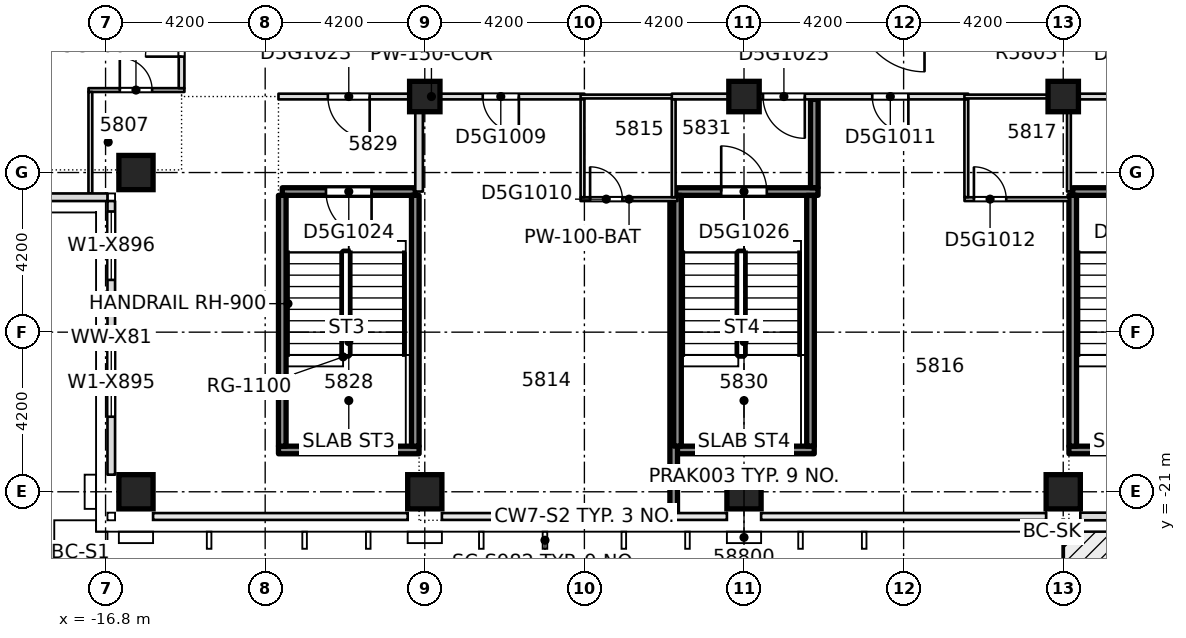
"""IFC4 building model, lengths in metres.
Left out: names, types, materials, properties, quantities, classifications, styles, units other than length and angle.
Written with IfcOpenShell. Run it as: python <this file> out.ifc"""

import sys

from ifc_helpers import new_model, si_unit, direction, frame, frame_2d, origin, origin_2d, place, context, subcontext, project, spatial, rectangle, extrude, element, fill, save


model = new_model("IFC4")
c1 = context("Model", 3, precision=1e-05, world=origin(), true_north=direction((0.0, 1.0)))
c2 = subcontext(c1, "Body", "Model", "MODEL_VIEW")
j1 = project(units=[si_unit("LENGTHUNIT", "METRE"), si_unit("PLANEANGLEUNIT", "RADIAN")], contexts=[c1])
p1 = place(None, origin())
s1 = spatial("IfcSite", under=j1, at=p1, CompositionType="ELEMENT")
p2 = place(p1, origin())
s2 = spatial("IfcBuilding", under=s1, at=p2, CompositionType="ELEMENT")
p3 = place(p2, frame((0.0, 0.0, 223.45)))
s3 = spatial("IfcBuildingStorey", under=s2, at=p3, CompositionType="ELEMENT", Elevation=223.45)
for number, where, z_axis, x_axis in (
    (1, (-16.0, -21.0, -0.4), (0.0, 0.0, 1.0), (1.0, 0.0, 0.0)),
    (2, (-8.4, -21.0, -0.4), (0.0, 0.0, 1.0), (1.0, 0.0, 0.0)),
    (3, (0.0, -21.0, -0.4), (0.0, 0.0, 1.0), (1.0, 0.0, 0.0)),
    (4, (8.4, -21.0, -0.4), (0.0, 0.0, 1.0), (1.0, 0.0, 0.0)),
    (5, (-16.0, -12.6, -0.4), (0.0, 0.0, 1.0), (1.0, 0.0, 0.0)),
):
    element("IfcColumn", number, at=place(p3, frame(where, z_axis=z_axis, x_axis=x_axis)), inside=s3, PredefinedType="COLUMN", context=c2, shape_type="SweptSolid", body=[
        extrude(rectangle(XDim=0.9, YDim=0.9, at=origin_2d()), origin(), (0.0, 0.0, 1.0), 3.45),
    ])
for number, where, z_axis, x_axis in (
    (6, (-8.4, -10.6, -0.4), (0.0, 0.0, 1.0), (1.0, 0.0, 0.0)),
    (7, (0.0, -10.6, -0.4), (0.0, 0.0, 1.0), (1.0, 0.0, 0.0)),
    (8, (8.4, -10.6, -0.4), (0.0, 0.0, 1.0), (1.0, 0.0, 0.0)),
):
    element("IfcColumn", number, at=place(p3, frame(where, z_axis=z_axis, x_axis=x_axis)), inside=s3, PredefinedType="COLUMN", context=c2, shape_type="SweptSolid", body=[
        extrude(rectangle(XDim=0.8, YDim=0.8, at=origin_2d()), origin(), (0.0, 0.0, 1.0), 3.45),
    ])
p4 = place(p3, frame((-1.848, -19.9, 0.0), z_axis=(0.0, 0.0, 1.0), x_axis=(1.0, 0.0, 0.0)))
e9 = element("IfcWall", 9, at=p4, inside=s3, PredefinedType="SOLIDWALL", context=c2, shape_type="SweptSolid", body=[
    extrude(rectangle(XDim=3.696, YDim=0.2, at=frame_2d((1.848, 0.0))), origin(), (0.0, 0.0, 1.0), 3.05),
])
p5 = place(p3, frame((-4.3, -13.3, 0.0), z_axis=(0.0, 0.0, 1.0), x_axis=(1.0, 0.0, 0.0)))
e10 = element("IfcWall", 10, at=p5, inside=s3, PredefinedType="PARTITIONING", context=c2, shape_type="SweptSolid", body=[
    extrude(rectangle(XDim=2.55, YDim=0.1, at=frame_2d((1.275, 0.0))), origin(), (0.0, 0.0, 1.0), 3.05),
])
p6 = place(p5, frame((0.25, 0.0, 0.0)))
e11 = element("IfcOpeningElement", 11, at=p6, cuts=e10, PredefinedType="OPENING", context=c2, shape_type="SweptSolid", body=[
    extrude(rectangle(XDim=0.85, YDim=2.1, at=frame_2d((0.425, 1.05))), frame((0.0, 0.06, 0.0), z_axis=(0.0, -1.0, 0.0), x_axis=(1.0, 0.0, 0.0)), (0.0, 0.0, 1.0), 0.12),
])
p7 = place(p3, frame((5.802, -13.3, 0.0), z_axis=(0.0, 0.0, 1.0), x_axis=(1.0, 0.0, 0.0)))
e12 = element("IfcWall", 12, at=p7, inside=s3, PredefinedType="PARTITIONING", context=c2, shape_type="SweptSolid", body=[
    extrude(rectangle(XDim=2.748, YDim=0.1, at=frame_2d((1.374, 0.0))), origin(), (0.0, 0.0, 1.0), 3.05),
])
p8 = place(p7, frame((0.248, 0.0, 0.0)))
e13 = element("IfcOpeningElement", 13, at=p8, cuts=e12, PredefinedType="OPENING", context=c2, shape_type="SweptSolid", body=[
    extrude(rectangle(XDim=0.85, YDim=2.1, at=frame_2d((0.425, 1.05))), frame((0.0, 0.06, 0.0), z_axis=(0.0, -1.0, 0.0), x_axis=(1.0, 0.0, 0.0)), (0.0, 0.0, 1.0), 0.12),
])
p9 = place(p3, frame((-12.15, -13.1, 0.0), z_axis=(0.0, 0.0, 1.0), x_axis=(1.0, 0.0, 0.0)))
e14 = element("IfcWall", 14, at=p9, inside=s3, PredefinedType="SOLIDWALL", context=c2, shape_type="SweptSolid", body=[
    extrude(rectangle(XDim=3.5, YDim=0.2, at=frame_2d((1.75, 0.0))), origin(), (0.0, 0.0, 1.0), 3.05),
])
p10 = place(p9, frame((1.15, 0.0, 0.0)))
e15 = element("IfcOpeningElement", 15, at=p10, cuts=e14, PredefinedType="OPENING", context=c2, shape_type="SweptSolid", body=[
    extrude(rectangle(XDim=1.2, YDim=2.1, at=frame_2d((0.6, 1.05))), frame((0.0, 0.11, 0.0), z_axis=(0.0, -1.0, 0.0), x_axis=(1.0, 0.0, 0.0)), (0.0, 0.0, 1.0), 0.22),
])
p11 = place(p3, frame((-1.798, -13.1, 0.0), z_axis=(0.0, 0.0, 1.0), x_axis=(1.0, 0.0, 0.0)))
e16 = element("IfcWall", 16, at=p11, inside=s3, PredefinedType="SOLIDWALL", context=c2, shape_type="SweptSolid", body=[
    extrude(rectangle(XDim=3.746, YDim=0.2, at=frame_2d((1.873, 0.0))), origin(), (0.0, 0.0, 1.0), 3.05),
])
p12 = place(p11, frame((1.198, 0.0, 0.0)))
e17 = element("IfcOpeningElement", 17, at=p12, cuts=e16, PredefinedType="OPENING", context=c2, shape_type="SweptSolid", body=[
    extrude(rectangle(XDim=1.2, YDim=2.1, at=frame_2d((0.6, 1.05))), frame((0.0, 0.11, 0.0), z_axis=(0.0, -1.0, 0.0), x_axis=(1.0, 0.0, 0.0)), (0.0, 0.0, 1.0), 0.22),
])
p13 = place(p3, frame((8.65, -13.1, 0.0), z_axis=(0.0, 0.0, 1.0), x_axis=(1.0, 0.0, 0.0)))
e18 = element("IfcWall", 18, at=p13, inside=s3, PredefinedType="SOLIDWALL", context=c2, shape_type="SweptSolid", body=[
    extrude(rectangle(XDim=3.5, YDim=0.2, at=frame_2d((1.75, 0.0))), origin(), (0.0, 0.0, 1.0), 3.05),
])
p14 = place(p13, frame((1.15, 0.0, 0.0)))
e19 = element("IfcOpeningElement", 19, at=p14, cuts=e18, PredefinedType="OPENING", context=c2, shape_type="SweptSolid", body=[
    extrude(rectangle(XDim=1.2, YDim=2.1, at=frame_2d((0.6, 1.05))), frame((0.0, 0.11, 0.0), z_axis=(0.0, -1.0, 0.0), x_axis=(1.0, 0.0, 0.0)), (0.0, 0.0, 1.0), 0.22),
])
p15 = place(p3, frame((-12.25, -10.6, 0.0), z_axis=(0.0, 0.0, 1.0), x_axis=(1.0, 0.0, 0.0)))
e20 = element("IfcWall", 20, at=p15, inside=s3, PredefinedType="PARTITIONING", context=c2, shape_type="SweptSolid", body=[
    extrude(rectangle(XDim=8.05, YDim=0.15, at=frame_2d((4.025, 0.0))), origin(), (0.0, 0.0, 1.0), 3.05),
])
p16 = place(p15, frame((5.375, 0.0, 0.0)))
e21 = element("IfcOpeningElement", 21, at=p16, cuts=e20, PredefinedType="OPENING", context=c2, shape_type="SweptSolid", body=[
    extrude(rectangle(XDim=0.95, YDim=2.1, at=frame_2d((0.475, 1.05))), frame((0.0, 0.085, 0.0), z_axis=(0.0, -1.0, 0.0), x_axis=(1.0, 0.0, 0.0)), (0.0, 0.0, 1.0), 0.17),
])
p17 = place(p15, frame((1.3, 0.0, 0.0)))
e22 = element("IfcOpeningElement", 22, at=p17, cuts=e20, PredefinedType="OPENING", context=c2, shape_type="SweptSolid", body=[
    extrude(rectangle(XDim=1.1, YDim=2.1, at=frame_2d((0.55, 1.05))), frame((0.0, 0.085, 0.0), z_axis=(0.0, -1.0, 0.0), x_axis=(1.0, 0.0, 0.0)), (0.0, 0.0, 1.0), 0.17),
])
p18 = place(p3, frame((-4.3, -10.6, 0.0), z_axis=(0.0, 0.0, 1.0), x_axis=(1.0, 0.0, 0.0)))
e23 = element("IfcWall", 23, at=p18, inside=s3, PredefinedType="PARTITIONING", context=c2, shape_type="SweptSolid", body=[
    extrude(rectangle(XDim=2.5, YDim=0.1, at=frame_2d((1.25, 0.0))), origin(), (0.0, 0.0, 1.0), 3.05),
])
p19 = place(p3, frame((-1.9, -10.6, 0.0), z_axis=(0.0, 0.0, 1.0), x_axis=(1.0, 0.0, 0.0)))
e24 = element("IfcWall", 24, at=p19, inside=s3, PredefinedType="PARTITIONING", context=c2, shape_type="SweptSolid", body=[
    extrude(rectangle(XDim=7.8, YDim=0.15, at=frame_2d((3.9, 0.0))), origin(), (0.0, 0.0, 1.0), 3.05),
])
p20 = place(p19, frame((5.275, 0.0, 0.0)))
e25 = element("IfcOpeningElement", 25, at=p20, cuts=e24, PredefinedType="OPENING", context=c2, shape_type="SweptSolid", body=[
    extrude(rectangle(XDim=0.95, YDim=2.1, at=frame_2d((0.475, 1.05))), frame((0.0, 0.085, 0.0), z_axis=(0.0, -1.0, 0.0), x_axis=(1.0, 0.0, 0.0)), (0.0, 0.0, 1.0), 0.17),
])
p21 = place(p19, frame((2.4, 0.0, 0.0)))
e26 = element("IfcOpeningElement", 26, at=p21, cuts=e24, PredefinedType="OPENING", context=c2, shape_type="SweptSolid", body=[
    extrude(rectangle(XDim=1.1, YDim=2.1, at=frame_2d((0.55, 1.05))), frame((0.0, 0.085, 0.0), z_axis=(0.0, -1.0, 0.0), x_axis=(1.0, 0.0, 0.0)), (0.0, 0.0, 1.0), 0.17),
])
p22 = place(p3, frame((5.8, -10.6, 0.0), z_axis=(0.0, 0.0, 1.0), x_axis=(1.0, 0.0, 0.0)))
e27 = element("IfcWall", 27, at=p22, inside=s3, PredefinedType="PARTITIONING", context=c2, shape_type="SweptSolid", body=[
    extrude(rectangle(XDim=2.8, YDim=0.1, at=frame_2d((1.4, 0.0))), origin(), (0.0, 0.0, 1.0), 3.05),
])
p23 = place(p3, frame((8.5, -10.6, 0.0), z_axis=(0.0, 0.0, 1.0), x_axis=(1.0, 0.0, 0.0)))
e28 = element("IfcWall", 28, at=p23, inside=s3, PredefinedType="PARTITIONING", context=c2, shape_type="SweptSolid", body=[
    extrude(rectangle(XDim=3.75, YDim=0.15, at=frame_2d((1.875, 0.0))), origin(), (0.0, 0.0, 1.0), 3.05),
])
p24 = place(p23, frame((1.35, 0.0, 0.0)))
e29 = element("IfcOpeningElement", 29, at=p24, cuts=e28, PredefinedType="OPENING", context=c2, shape_type="SweptSolid", body=[
    extrude(rectangle(XDim=1.1, YDim=2.1, at=frame_2d((0.55, 1.05))), frame((0.0, 0.085, 0.0), z_axis=(0.0, -1.0, 0.0), x_axis=(1.0, 0.0, 0.0)), (0.0, 0.0, 1.0), 0.17),
])
p25 = place(p3, frame((-17.25, -10.43, 0.0), z_axis=(0.0, 0.0, 1.0), x_axis=(1.0, 0.0, 0.0)))
e30 = element("IfcWall", 30, at=p25, inside=s3, PredefinedType="PARTITIONING", context=c2, shape_type="SweptSolid", body=[
    extrude(rectangle(XDim=2.525, YDim=0.1, at=frame_2d((1.262, 0.0))), origin(), (0.0, 0.0, 1.0), 3.05),
])
p26 = place(p25, frame((0.825, 0.0, 0.0)))
e31 = element("IfcOpeningElement", 31, at=p26, cuts=e30, PredefinedType="OPENING", context=c2, shape_type="SweptSolid", body=[
    extrude(rectangle(XDim=0.85, YDim=2.1, at=frame_2d((0.425, 1.05))), frame((0.0, 0.06, 0.0), z_axis=(0.0, -1.0, 0.0), x_axis=(1.0, 0.0, 0.0)), (0.0, 0.0, 1.0), 0.12),
])
p27 = place(p3, frame((-17.2, -13.15, 0.0), z_axis=(0.0, 0.0, 1.0), x_axis=(0.0, 1.0, 0.0)))
e32 = element("IfcWall", 32, at=p27, inside=s3, PredefinedType="PARTITIONING", context=c2, shape_type="SweptSolid", body=[
    extrude(rectangle(XDim=2.67, YDim=0.1, at=frame_2d((1.335, 0.0))), origin(), (0.0, 0.0, 1.0), 3.05),
])
p28 = place(p3, frame((-14.8, -10.38, 0.0), z_axis=(0.0, 0.0, 1.0), x_axis=(0.0, 1.0, 0.0)))
e33 = element("IfcWall", 33, at=p28, inside=s3, PredefinedType="PARTITIONING", context=c2, shape_type="SweptSolid", body=[
    extrude(rectangle(XDim=20.805, YDim=0.15, at=frame_2d((10.402, 0.0))), origin(), (0.0, 0.0, 1.0), 3.05),
])
p29 = place(p28, frame((0.83, 0.0, 0.0)))
e34 = element("IfcOpeningElement", 34, at=p29, cuts=e33, PredefinedType="OPENING", context=c2, shape_type="SweptSolid", body=[
    extrude(rectangle(XDim=0.95, YDim=2.1, at=frame_2d((0.475, 1.05))), frame((0.0, 0.085, 0.0), z_axis=(0.0, -1.0, 0.0), x_axis=(1.0, 0.0, 0.0)), (0.0, 0.0, 1.0), 0.17),
])
p30 = place(p28, frame((9.83, 0.0, 0.0)))
e35 = element("IfcOpeningElement", 35, at=p30, cuts=e33, PredefinedType="OPENING", context=c2, shape_type="SweptSolid", body=[
    extrude(rectangle(XDim=1.1, YDim=2.1, at=frame_2d((0.55, 1.05))), frame((0.0, 0.085, 0.0), z_axis=(0.0, -1.0, 0.0), x_axis=(1.0, 0.0, 0.0)), (0.0, 0.0, 1.0), 0.17),
])
p31 = place(p28, frame((4.68, 0.0, 0.0)))
e36 = element("IfcOpeningElement", 36, at=p31, cuts=e33, PredefinedType="OPENING", context=c2, shape_type="SweptSolid", body=[
    extrude(rectangle(XDim=1.0, YDim=2.1, at=frame_2d((0.5, 1.05))), frame((0.0, 0.085, 0.0), z_axis=(0.0, -1.0, 0.0), x_axis=(1.0, 0.0, 0.0)), (0.0, 0.0, 1.0), 0.17),
])
p32 = place(p3, frame((-8.55, -13.1, 0.0), z_axis=(0.0, 0.0, 1.0), x_axis=(0.0, 1.0, 0.0)))
e37 = element("IfcWall", 37, at=p32, inside=s3, PredefinedType="PARTITIONING", context=c2, shape_type="SweptSolid", body=[
    extrude(rectangle(XDim=2.425, YDim=0.2, at=frame_2d((1.212, 0.0))), origin(), (0.0, 0.0, 1.0), 3.05),
])
p33 = place(p3, frame((-4.25, -13.25, 0.0), z_axis=(0.0, 0.0, 1.0), x_axis=(0.0, 1.0, 0.0)))
e38 = element("IfcWall", 38, at=p33, inside=s3, PredefinedType="PARTITIONING", context=c2, shape_type="SweptSolid", body=[
    extrude(rectangle(XDim=2.575, YDim=0.1, at=frame_2d((1.288, 0.0))), origin(), (0.0, 0.0, 1.0), 3.05),
])
p34 = place(p3, frame((-1.85, -21.55, 0.0), z_axis=(0.0, 0.0, 1.0), x_axis=(0.0, 1.0, 0.0)))
e39 = element("IfcWall", 39, at=p34, inside=s3, PredefinedType="SOLIDWALL", context=c2, shape_type="SweptSolid", body=[
    extrude(rectangle(XDim=8.2, YDim=0.2, at=frame_2d((4.1, 0.0))), origin(), (0.0, 0.0, 1.0), 3.05),
])
p35 = place(p3, frame((-1.85, -13.25, 0.0), z_axis=(0.0, 0.0, 1.0), x_axis=(0.0, 1.0, 0.0)))
e40 = element("IfcWall", 40, at=p35, inside=s3, PredefinedType="PARTITIONING", context=c2, shape_type="SweptSolid", body=[
    extrude(rectangle(XDim=2.575, YDim=0.1, at=frame_2d((1.288, 0.0))), origin(), (0.0, 0.0, 1.0), 3.05),
])
for number, where, z_axis, x_axis in (
    (41, (-1.75, -19.798, 0.0), (0.0, 0.0, 1.0), (0.0, 1.0, 0.0)),
    (42, (1.75, -19.798, 0.0), (0.0, 0.0, 1.0), (0.0, 1.0, 0.0)),
):
    element("IfcWall", number, at=place(p3, frame(where, z_axis=z_axis, x_axis=x_axis)), inside=s3, PredefinedType="SOLIDWALL", context=c2, shape_type="SweptSolid", body=[
        extrude(rectangle(XDim=6.596, YDim=0.2, at=frame_2d((3.298, 0.0))), origin(), (0.0, 0.0, 1.0), 3.05),
    ])
p36 = place(p3, frame((1.85, -12.998, 0.0), z_axis=(0.0, 0.0, 1.0), x_axis=(0.0, 1.0, 0.0)))
e43 = element("IfcWall", 43, at=p36, inside=s3, PredefinedType="SOLIDWALL", context=c2, shape_type="SweptSolid", body=[
    extrude(rectangle(XDim=2.323, YDim=0.2, at=frame_2d((1.162, 0.0))), origin(), (0.0, 0.0, 1.0), 3.05),
])
p37 = place(p3, frame((5.85, -13.248, 0.0), z_axis=(0.0, 0.0, 1.0), x_axis=(0.0, 1.0, 0.0)))
e44 = element("IfcWall", 44, at=p37, inside=s3, PredefinedType="PARTITIONING", context=c2, shape_type="SweptSolid", body=[
    extrude(rectangle(XDim=2.573, YDim=0.1, at=frame_2d((1.287, 0.0))), origin(), (0.0, 0.0, 1.0), 3.05),
])
p38 = place(p3, frame((8.55, -13.1, 0.0), z_axis=(0.0, 0.0, 1.0), x_axis=(0.0, 1.0, 0.0)))
e45 = element("IfcWall", 45, at=p38, inside=s3, PredefinedType="PARTITIONING", context=c2, shape_type="SweptSolid", body=[
    extrude(rectangle(XDim=2.425, YDim=0.1, at=frame_2d((1.212, 0.0))), origin(), (0.0, 0.0, 1.0), 3.05),
])
p39 = place(p3, frame((8.85, -21.65, 0.0), z_axis=(0.0, 0.0, 1.0), x_axis=(1.0, 0.0, 0.0)))
e46 = element("IfcWall", 46, at=p39, inside=s3, PredefinedType="STANDARD", context=c2, shape_type="SweptSolid", body=[
    extrude(rectangle(XDim=6.7, YDim=0.2, at=frame_2d((3.35, 0.0))), origin(), (0.0, 0.0, 1.0), 3.05),
])
p40 = place(p39, frame((4.725, 0.0, 0.0)))
e47 = element("IfcOpeningElement", 47, at=p40, cuts=e46, PredefinedType="OPENING", context=c2, shape_type="SweptSolid", body=[
    extrude(rectangle(XDim=1.0, YDim=2.4, at=frame_2d((0.5, 1.2))), frame((0.0, 0.11, 0.0), z_axis=(0.0, -1.0, 0.0), x_axis=(1.0, 0.0, 0.0)), (0.0, 0.0, 1.0), 0.22),
])
p41 = place(p3, frame((-24.75, -13.25, 0.0), z_axis=(0.0, 0.0, 1.0), x_axis=(1.0, 0.0, 0.0)))
e48 = element("IfcWall", 48, at=p41, inside=s3, PredefinedType="STANDARD", context=c2, shape_type="SweptSolid", body=[
    extrude(rectangle(XDim=8.0, YDim=0.2, at=frame_2d((4.0, 0.0))), origin(), (0.0, 0.0, 1.0), 3.05),
])
p42 = place(p3, frame((-16.65, -13.35, 0.0), z_axis=(0.0, 0.0, 1.0), x_axis=(0.0, -1.0, 0.0)))
e49 = element("IfcWall", 49, at=p42, inside=s3, PredefinedType="STANDARD", context=c2, shape_type="SweptSolid", body=[
    extrude(rectangle(XDim=7.2, YDim=0.2, at=frame_2d((3.6, 0.0))), origin(), (0.0, 0.0, 1.0), 3.05),
])
p43 = place(p42, frame((3.875, 0.0, 0.2)))
e50 = element("IfcOpeningElement", 50, at=p43, cuts=e49, PredefinedType="OPENING", context=c2, shape_type="SweptSolid", body=[
    extrude(rectangle(XDim=1.8, YDim=2.65, at=frame_2d((0.9, 1.325))), frame((0.0, 0.11, 0.0), z_axis=(0.0, -1.0, 0.0), x_axis=(1.0, 0.0, 0.0)), (0.0, 0.0, 1.0), 0.22),
])
p44 = place(p42, frame((0.275, 0.0, 0.2)))
e51 = element("IfcOpeningElement", 51, at=p44, cuts=e49, PredefinedType="OPENING", context=c2, shape_type="SweptSolid", body=[
    extrude(rectangle(XDim=1.8, YDim=2.65, at=frame_2d((0.9, 1.325))), frame((0.0, 0.11, 0.0), z_axis=(0.0, -1.0, 0.0), x_axis=(1.0, 0.0, 0.0)), (0.0, 0.0, 1.0), 0.22),
])
p45 = place(p3, frame((-12.25, -19.9, 0.0), z_axis=(0.0, 0.0, 1.0), x_axis=(1.0, 0.0, 0.0)))
e52 = element("IfcWall", 52, at=p45, inside=s3, PredefinedType="SOLIDWALL", context=c2, shape_type="SweptSolid", body=[
    extrude(rectangle(XDim=3.7, YDim=0.2, at=frame_2d((1.85, 0.0))), origin(), (0.0, 0.0, 1.0), 3.05),
])
for number, where, z_axis, x_axis in (
    (53, (-12.15, -19.8, 0.0), (0.0, 0.0, 1.0), (0.0, 1.0, 0.0)),
    (54, (-8.65, -19.8, 0.0), (0.0, 0.0, 1.0), (0.0, 1.0, 0.0)),
):
    element("IfcWall", number, at=place(p3, frame(where, z_axis=z_axis, x_axis=x_axis)), inside=s3, PredefinedType="SOLIDWALL", context=c2, shape_type="SweptSolid", body=[
        extrude(rectangle(XDim=6.6, YDim=0.2, at=frame_2d((3.3, 0.0))), origin(), (0.0, 0.0, 1.0), 3.05),
    ])
p46 = place(p3, frame((8.55, -19.9, 0.0), z_axis=(0.0, 0.0, 1.0), x_axis=(1.0, 0.0, 0.0)))
e55 = element("IfcWall", 55, at=p46, inside=s3, PredefinedType="SOLIDWALL", context=c2, shape_type="SweptSolid", body=[
    extrude(rectangle(XDim=3.7, YDim=0.2, at=frame_2d((1.85, 0.0))), origin(), (0.0, 0.0, 1.0), 3.05),
])
p47 = place(p3, frame((8.65, -19.8, 0.0), z_axis=(0.0, 0.0, 1.0), x_axis=(0.0, 1.0, 0.0)))
e56 = element("IfcWall", 56, at=p47, inside=s3, PredefinedType="SOLIDWALL", context=c2, shape_type="SweptSolid", body=[
    extrude(rectangle(XDim=6.6, YDim=0.2, at=frame_2d((3.3, 0.0))), origin(), (0.0, 0.0, 1.0), 3.05),
])
p48 = place(p29, origin())
e57 = element("IfcDoor", 57, at=p48, inside=s3, OperationType="SINGLE_SWING_LEFT", PredefinedType="DOOR", context=c2, shape_type="SweptSolid", body=[
    extrude(rectangle(XDim=0.95, YDim=2.1, at=frame_2d((0.475, 1.05))), frame((0.0, 0.025, 0.0), z_axis=(0.0, -1.0, 0.0), x_axis=(1.0, 0.0, 0.0)), (0.0, 0.0, 1.0), 0.05),
])
fill(e34, e57)
p49 = place(p26, origin())
e58 = element("IfcDoor", 58, at=p49, inside=s3, OperationType="SINGLE_SWING_RIGHT", PredefinedType="DOOR", context=c2, shape_type="SweptSolid", body=[
    extrude(rectangle(XDim=0.85, YDim=2.1, at=frame_2d((0.425, 1.05))), frame((0.0, 0.025, 0.0), z_axis=(0.0, -1.0, 0.0), x_axis=(1.0, 0.0, 0.0)), (0.0, 0.0, 1.0), 0.05),
])
fill(e31, e58)
p50 = place(p16, origin())
e59 = element("IfcDoor", 59, at=p50, inside=s3, OperationType="SINGLE_SWING_LEFT", PredefinedType="DOOR", context=c2, shape_type="SweptSolid", body=[
    extrude(rectangle(XDim=0.95, YDim=2.1, at=frame_2d((0.475, 1.05))), frame((0.0, 0.025, 0.0), z_axis=(0.0, -1.0, 0.0), x_axis=(1.0, 0.0, 0.0)), (0.0, 0.0, 1.0), 0.05),
])
fill(e21, e59)
p51 = place(p6, origin())
e60 = element("IfcDoor", 60, at=p51, inside=s3, OperationType="SINGLE_SWING_LEFT", PredefinedType="DOOR", context=c2, shape_type="SweptSolid", body=[
    extrude(rectangle(XDim=0.85, YDim=2.1, at=frame_2d((0.425, 1.05))), frame((0.0, 0.025, 0.0), z_axis=(0.0, -1.0, 0.0), x_axis=(1.0, 0.0, 0.0)), (0.0, 0.0, 1.0), 0.05),
])
fill(e11, e60)
p52 = place(p20, origin())
e61 = element("IfcDoor", 61, at=p52, inside=s3, OperationType="SINGLE_SWING_LEFT", PredefinedType="DOOR", context=c2, shape_type="SweptSolid", body=[
    extrude(rectangle(XDim=0.95, YDim=2.1, at=frame_2d((0.475, 1.05))), frame((0.0, 0.025, 0.0), z_axis=(0.0, -1.0, 0.0), x_axis=(1.0, 0.0, 0.0)), (0.0, 0.0, 1.0), 0.05),
])
fill(e25, e61)
p53 = place(p8, origin())
e62 = element("IfcDoor", 62, at=p53, inside=s3, OperationType="SINGLE_SWING_LEFT", PredefinedType="DOOR", context=c2, shape_type="SweptSolid", body=[
    extrude(rectangle(XDim=0.85, YDim=2.1, at=frame_2d((0.425, 1.05))), frame((0.0, 0.025, 0.0), z_axis=(0.0, -1.0, 0.0), x_axis=(1.0, 0.0, 0.0)), (0.0, 0.0, 1.0), 0.05),
])
fill(e13, e62)
p54 = place(p17, origin())
e63 = element("IfcDoor", 63, at=p54, inside=s3, OperationType="SINGLE_SWING_RIGHT", PredefinedType="DOOR", context=c2, shape_type="SweptSolid", body=[
    extrude(rectangle(XDim=1.1, YDim=2.1, at=frame_2d((0.55, 1.05))), frame((0.0, 0.025, 0.0), z_axis=(0.0, -1.0, 0.0), x_axis=(1.0, 0.0, 0.0)), (0.0, 0.0, 1.0), 0.05),
])
fill(e22, e63)
p55 = place(p10, origin())
e64 = element("IfcDoor", 64, at=p55, inside=s3, OperationType="SINGLE_SWING_RIGHT", PredefinedType="DOOR", context=c2, shape_type="SweptSolid", body=[
    extrude(rectangle(XDim=1.2, YDim=2.1, at=frame_2d((0.6, 1.05))), frame((0.0, 0.025, 0.0), z_axis=(0.0, -1.0, 0.0), x_axis=(1.0, 0.0, 0.0)), (0.0, 0.0, 1.0), 0.05),
])
fill(e15, e64)
p56 = place(p21, origin())
e65 = element("IfcDoor", 65, at=p56, inside=s3, OperationType="SINGLE_SWING_LEFT", PredefinedType="DOOR", context=c2, shape_type="SweptSolid", body=[
    extrude(rectangle(XDim=1.1, YDim=2.1, at=frame_2d((0.55, 1.05))), frame((0.0, 0.025, 0.0), z_axis=(0.0, -1.0, 0.0), x_axis=(1.0, 0.0, 0.0)), (0.0, 0.0, 1.0), 0.05),
])
fill(e26, e65)
p57 = place(p12, origin())
e66 = element("IfcDoor", 66, at=p57, inside=s3, OperationType="SINGLE_SWING_RIGHT", PredefinedType="DOOR", context=c2, shape_type="SweptSolid", body=[
    extrude(rectangle(XDim=1.2, YDim=2.1, at=frame_2d((0.6, 1.05))), frame((0.0, 0.025, 0.0), z_axis=(0.0, -1.0, 0.0), x_axis=(1.0, 0.0, 0.0)), (0.0, 0.0, 1.0), 0.05),
])
fill(e17, e66)
p58 = place(p43, origin())
e67 = element("IfcWindow", 67, at=p58, inside=s3, PartitioningType="SINGLE_PANEL", PredefinedType="WINDOW", context=c2, shape_type="SweptSolid", body=[
    extrude(rectangle(XDim=1.8, YDim=2.65, at=frame_2d((0.9, 1.325))), frame((0.0, 0.03, 0.0), z_axis=(0.0, -1.0, 0.0), x_axis=(1.0, 0.0, 0.0)), (0.0, 0.0, 1.0), 0.06),
])
fill(e50, e67)
p59 = place(p44, origin())
e68 = element("IfcWindow", 68, at=p59, inside=s3, PartitioningType="SINGLE_PANEL", PredefinedType="WINDOW", context=c2, shape_type="SweptSolid", body=[
    extrude(rectangle(XDim=1.8, YDim=2.65, at=frame_2d((0.9, 1.325))), frame((0.0, 0.03, 0.0), z_axis=(0.0, -1.0, 0.0), x_axis=(1.0, 0.0, 0.0)), (0.0, 0.0, 1.0), 0.06),
])
fill(e51, e68)
save(model, sys.argv[1])
